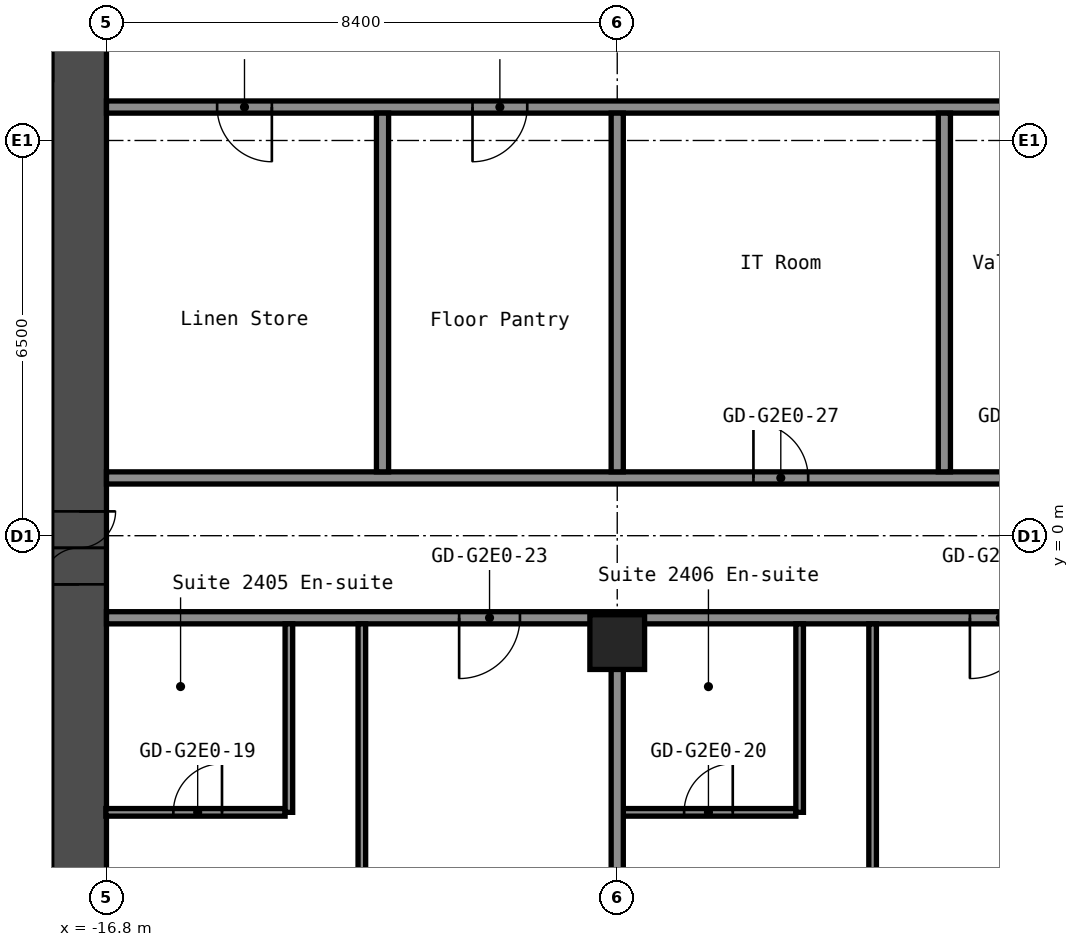
"""IFC4 building model, lengths in metres.
Left out: names, types, materials, properties, quantities, classifications, styles, units other than length and angle.
Written with IfcOpenShell. Run it as: python <this file> out.ifc"""

import sys

from ifc_helpers import new_model, si_unit, direction, frame, frame_2d, origin, origin_2d, place, context, subcontext, project, spatial, rectangle, hollow_rectangle, extrude, element, fill, save


model = new_model("IFC4")
c1 = context("Model", 3, precision=1e-05, world=origin(), true_north=direction((0.0, 1.0)))
c2 = subcontext(c1, "Body", "Model", "MODEL_VIEW")
j1 = project(units=[si_unit("LENGTHUNIT", "METRE"), si_unit("PLANEANGLEUNIT", "RADIAN")], contexts=[c1])
p1 = place(None, origin())
s1 = spatial("IfcSite", under=j1, at=p1, CompositionType="ELEMENT")
p2 = place(p1, origin())
s2 = spatial("IfcBuilding", under=s1, at=p2, CompositionType="ELEMENT")
p3 = place(p2, frame((0.0, 0.0, 88.2)))
s3 = spatial("IfcBuildingStorey", under=s2, at=p3, CompositionType="ELEMENT", Elevation=88.2)
p4 = place(p3, frame((-8.4, -1.75, 0.0), z_axis=(0.0, 0.0, 1.0), x_axis=(1.0, 0.0, 0.0)))
e1 = element("IfcColumn", 1, at=p4, inside=s3, PredefinedType="COLUMN", context=c2, shape_type="SweptSolid", body=[
    extrude(hollow_rectangle(XDim=0.9, YDim=0.9, WallThickness=0.036, at=origin_2d()), origin(), (0.0, 0.0, 1.0), 2.8),
])
p5 = place(p3, frame((-17.25, -8.4, 0.0), z_axis=(0.0, 0.0, 1.0), x_axis=(0.0, 1.0, 0.0)))
e2 = element("IfcWall", 2, at=p5, inside=s3, PredefinedType="SHEAR", context=c2, shape_type="SweptSolid", body=[
    extrude(rectangle(XDim=16.8, YDim=0.9, at=frame_2d((8.4, 0.0))), origin(), (0.0, 0.0, 1.0), 2.8),
])
p6 = place(p5, frame((7.6, 0.0, 0.0)))
e3 = element("IfcOpeningElement", 3, at=p6, cuts=e2, PredefinedType="OPENING", context=c2, shape_type="SweptSolid", body=[
    extrude(rectangle(XDim=1.2, YDim=2.1, at=frame_2d((0.6, 1.05))), frame((0.0, 0.46, 0.0), z_axis=(0.0, -1.0, 0.0), x_axis=(1.0, 0.0, 0.0)), (0.0, 0.0, 1.0), 0.92),
])
p7 = place(p3, frame((-32.7, 7.95, 0.0), z_axis=(0.0, 0.0, 1.0), x_axis=(1.0, 0.0, 0.0)))
e4 = element("IfcWall", 4, at=p7, inside=s3, PredefinedType="SHEAR", context=c2, shape_type="SweptSolid", body=[
    extrude(rectangle(XDim=15.0, YDim=0.9, at=frame_2d((7.5, 0.0))), origin(), (0.0, 0.0, 1.0), 2.8),
])
p8 = place(p7, frame((3.4, 0.0, 0.0)))
e5 = element("IfcOpeningElement", 5, at=p8, cuts=e4, PredefinedType="OPENING", context=c2, shape_type="SweptSolid", body=[
    extrude(rectangle(XDim=1.2, YDim=2.1, at=frame_2d((0.6, 1.05))), frame((0.0, 0.46, 0.0), z_axis=(0.0, -1.0, 0.0), x_axis=(1.0, 0.0, 0.0)), (0.0, 0.0, 1.0), 0.92),
])
p9 = place(p7, frame((0.75, 0.0, 0.0)))
e6 = element("IfcOpeningElement", 6, at=p9, cuts=e4, PredefinedType="OPENING", context=c2, shape_type="SweptSolid", body=[
    extrude(rectangle(XDim=0.9, YDim=2.1, at=frame_2d((0.45, 1.05))), frame((0.0, 0.46, 0.0), z_axis=(0.0, -1.0, 0.0), x_axis=(1.0, 0.0, 0.0)), (0.0, 0.0, 1.0), 0.92),
])
p10 = place(p3, frame((-16.81, -4.55, 0.0), z_axis=(0.0, 0.0, 1.0), x_axis=(1.0, 0.0, 0.0)))
e7 = element("IfcWall", 7, at=p10, inside=s3, PredefinedType="PARTITIONING", context=c2, shape_type="SweptSolid", body=[
    extrude(rectangle(XDim=2.948, YDim=0.125, at=frame_2d((1.474, 0.0))), origin(), (0.0, 0.0, 1.0), 2.8),
])
p11 = place(p10, frame((1.11, 0.0, 0.0)))
e8 = element("IfcOpeningElement", 8, at=p11, cuts=e7, PredefinedType="OPENING", context=c2, shape_type="SweptSolid", body=[
    extrude(rectangle(XDim=0.8, YDim=2.1, at=frame_2d((0.4, 1.05))), frame((0.0, 0.073, 0.0), z_axis=(0.0, -1.0, 0.0), x_axis=(1.0, 0.0, 0.0)), (0.0, 0.0, 1.0), 0.145),
])
p12 = place(p3, frame((-8.3, -4.55, 0.0), z_axis=(0.0, 0.0, 1.0), x_axis=(1.0, 0.0, 0.0)))
e9 = element("IfcWall", 9, at=p12, inside=s3, PredefinedType="PARTITIONING", context=c2, shape_type="SweptSolid", body=[
    extrude(rectangle(XDim=2.838, YDim=0.125, at=frame_2d((1.419, 0.0))), origin(), (0.0, 0.0, 1.0), 2.8),
])
p13 = place(p12, frame((1.0, 0.0, 0.0)))
e10 = element("IfcOpeningElement", 10, at=p13, cuts=e9, PredefinedType="OPENING", context=c2, shape_type="SweptSolid", body=[
    extrude(rectangle(XDim=0.8, YDim=2.1, at=frame_2d((0.4, 1.05))), frame((0.0, 0.073, 0.0), z_axis=(0.0, -1.0, 0.0), x_axis=(1.0, 0.0, 0.0)), (0.0, 0.0, 1.0), 0.145),
])
p14 = place(p3, frame((-16.8, -1.35, 0.0), z_axis=(0.0, 0.0, 1.0), x_axis=(1.0, 0.0, 0.0)))
e11 = element("IfcWall", 11, at=p14, inside=s3, PredefinedType="PARTITIONING", context=c2, shape_type="SweptSolid", body=[
    extrude(rectangle(XDim=33.6, YDim=0.2, at=frame_2d((16.8, 0.0))), origin(), (0.0, 0.0, 1.0), 2.8),
])
p15 = place(p14, frame((5.8, 0.0, 0.0)))
e12 = element("IfcOpeningElement", 12, at=p15, cuts=e11, PredefinedType="OPENING", context=c2, shape_type="SweptSolid", body=[
    extrude(rectangle(XDim=1.0, YDim=2.1, at=frame_2d((0.5, 1.05))), frame((0.0, 0.11, 0.0), z_axis=(0.0, -1.0, 0.0), x_axis=(1.0, 0.0, 0.0)), (0.0, 0.0, 1.0), 0.22),
])
p16 = place(p14, frame((14.2, 0.0, 0.0)))
e13 = element("IfcOpeningElement", 13, at=p16, cuts=e11, PredefinedType="OPENING", context=c2, shape_type="SweptSolid", body=[
    extrude(rectangle(XDim=1.0, YDim=2.1, at=frame_2d((0.5, 1.05))), frame((0.0, 0.11, 0.0), z_axis=(0.0, -1.0, 0.0), x_axis=(1.0, 0.0, 0.0)), (0.0, 0.0, 1.0), 0.22),
])
p17 = place(p14, frame((22.6, 0.0, 0.0)))
e14 = element("IfcOpeningElement", 14, at=p17, cuts=e11, PredefinedType="OPENING", context=c2, shape_type="SweptSolid", body=[
    extrude(rectangle(XDim=1.0, YDim=2.1, at=frame_2d((0.5, 1.05))), frame((0.0, 0.11, 0.0), z_axis=(0.0, -1.0, 0.0), x_axis=(1.0, 0.0, 0.0)), (0.0, 0.0, 1.0), 0.22),
])
p18 = place(p14, frame((26.8, 0.0, 0.0)))
e15 = element("IfcOpeningElement", 15, at=p18, cuts=e11, PredefinedType="OPENING", context=c2, shape_type="SweptSolid", body=[
    extrude(rectangle(XDim=1.0, YDim=2.1, at=frame_2d((0.5, 1.05))), frame((0.0, 0.11, 0.0), z_axis=(0.0, -1.0, 0.0), x_axis=(1.0, 0.0, 0.0)), (0.0, 0.0, 1.0), 0.22),
])
p19 = place(p3, frame((-16.8, 0.95, 0.0), z_axis=(0.0, 0.0, 1.0), x_axis=(1.0, 0.0, 0.0)))
e16 = element("IfcWall", 16, at=p19, inside=s3, PredefinedType="PARTITIONING", context=c2, shape_type="SweptSolid", body=[
    extrude(rectangle(XDim=33.6, YDim=0.2, at=frame_2d((16.8, 0.0))), origin(), (0.0, 0.0, 1.0), 2.8),
])
p20 = place(p19, frame((10.64, 0.0, 0.0)))
e17 = element("IfcOpeningElement", 17, at=p20, cuts=e16, PredefinedType="OPENING", context=c2, shape_type="SweptSolid", body=[
    extrude(rectangle(XDim=0.9, YDim=2.1, at=frame_2d((0.45, 1.05))), frame((0.0, 0.11, 0.0), z_axis=(0.0, -1.0, 0.0), x_axis=(1.0, 0.0, 0.0)), (0.0, 0.0, 1.0), 0.22),
])
p21 = place(p19, frame((14.84, 0.0, 0.0)))
e18 = element("IfcOpeningElement", 18, at=p21, cuts=e16, PredefinedType="OPENING", context=c2, shape_type="SweptSolid", body=[
    extrude(rectangle(XDim=0.9, YDim=2.1, at=frame_2d((0.45, 1.05))), frame((0.0, 0.11, 0.0), z_axis=(0.0, -1.0, 0.0), x_axis=(1.0, 0.0, 0.0)), (0.0, 0.0, 1.0), 0.22),
])
p22 = place(p19, frame((26.345, 0.0, 0.0)))
e19 = element("IfcOpeningElement", 19, at=p22, cuts=e16, PredefinedType="OPENING", context=c2, shape_type="SweptSolid", body=[
    extrude(rectangle(XDim=0.9, YDim=2.1, at=frame_2d((0.45, 1.05))), frame((0.0, 0.11, 0.0), z_axis=(0.0, -1.0, 0.0), x_axis=(1.0, 0.0, 0.0)), (0.0, 0.0, 1.0), 0.22),
])
p23 = place(p19, frame((30.545, 0.0, 0.0)))
e20 = element("IfcOpeningElement", 20, at=p23, cuts=e16, PredefinedType="OPENING", context=c2, shape_type="SweptSolid", body=[
    extrude(rectangle(XDim=0.9, YDim=2.1, at=frame_2d((0.45, 1.05))), frame((0.0, 0.11, 0.0), z_axis=(0.0, -1.0, 0.0), x_axis=(1.0, 0.0, 0.0)), (0.0, 0.0, 1.0), 0.22),
])
p24 = place(p3, frame((-16.8, 7.05, 0.0), z_axis=(0.0, 0.0, 1.0), x_axis=(1.0, 0.0, 0.0)))
e21 = element("IfcWall", 21, at=p24, inside=s3, PredefinedType="PARTITIONING", context=c2, shape_type="SweptSolid", body=[
    extrude(rectangle(XDim=33.6, YDim=0.2, at=frame_2d((16.8, 0.0))), origin(), (0.0, 0.0, 1.0), 2.8),
])
p25 = place(p24, frame((1.82, 0.0, 0.0)))
e22 = element("IfcOpeningElement", 22, at=p25, cuts=e21, PredefinedType="OPENING", context=c2, shape_type="SweptSolid", body=[
    extrude(rectangle(XDim=0.9, YDim=2.1, at=frame_2d((0.45, 1.05))), frame((0.0, 0.11, 0.0), z_axis=(0.0, -1.0, 0.0), x_axis=(1.0, 0.0, 0.0)), (0.0, 0.0, 1.0), 0.22),
])
p26 = place(p24, frame((6.02, 0.0, 0.0)))
e23 = element("IfcOpeningElement", 23, at=p26, cuts=e21, PredefinedType="OPENING", context=c2, shape_type="SweptSolid", body=[
    extrude(rectangle(XDim=0.9, YDim=2.1, at=frame_2d((0.45, 1.05))), frame((0.0, 0.11, 0.0), z_axis=(0.0, -1.0, 0.0), x_axis=(1.0, 0.0, 0.0)), (0.0, 0.0, 1.0), 0.22),
])
p27 = place(p24, frame((18.87, 0.0, 0.0)))
e24 = element("IfcOpeningElement", 24, at=p27, cuts=e21, PredefinedType="OPENING", context=c2, shape_type="SweptSolid", body=[
    extrude(rectangle(XDim=0.9, YDim=2.1, at=frame_2d((0.45, 1.05))), frame((0.0, 0.11, 0.0), z_axis=(0.0, -1.0, 0.0), x_axis=(1.0, 0.0, 0.0)), (0.0, 0.0, 1.0), 0.22),
])
p28 = place(p24, frame((23.07, 0.0, 0.0)))
e25 = element("IfcOpeningElement", 25, at=p28, cuts=e21, PredefinedType="OPENING", context=c2, shape_type="SweptSolid", body=[
    extrude(rectangle(XDim=0.9, YDim=2.1, at=frame_2d((0.45, 1.05))), frame((0.0, 0.11, 0.0), z_axis=(0.0, -1.0, 0.0), x_axis=(1.0, 0.0, 0.0)), (0.0, 0.0, 1.0), 0.22),
])
p29 = place(p3, frame((-13.8, -4.55, 0.0), z_axis=(0.0, 0.0, 1.0), x_axis=(0.0, 1.0, 0.0)))
e26 = element("IfcWall", 26, at=p29, inside=s3, PredefinedType="PARTITIONING", context=c2, shape_type="SweptSolid", body=[
    extrude(rectangle(XDim=3.1, YDim=0.125, at=frame_2d((1.55, 0.0))), origin(), (0.0, 0.0, 1.0), 2.8),
])
p30 = place(p3, frame((-12.6, -15.55, 0.0), z_axis=(0.0, 0.0, 1.0), x_axis=(0.0, 1.0, 0.0)))
e27 = element("IfcWall", 27, at=p30, inside=s3, PredefinedType="PARTITIONING", context=c2, shape_type="SweptSolid", body=[
    extrude(rectangle(XDim=14.1, YDim=0.125, at=frame_2d((7.05, 0.0))), origin(), (0.0, 0.0, 1.0), 2.8),
])
p31 = place(p30, frame((9.15, 0.0, 0.0)))
e28 = element("IfcOpeningElement", 28, at=p31, cuts=e27, PredefinedType="OPENING", context=c2, shape_type="SweptSolid", body=[
    extrude(rectangle(XDim=0.9, YDim=2.1, at=frame_2d((0.45, 1.05))), frame((0.0, 0.073, 0.0), z_axis=(0.0, -1.0, 0.0), x_axis=(1.0, 0.0, 0.0)), (0.0, 0.0, 1.0), 0.145),
])
p32 = place(p3, frame((-12.26, 1.05, 0.0), z_axis=(0.0, 0.0, 1.0), x_axis=(0.0, 1.0, 0.0)))
e29 = element("IfcWall", 29, at=p32, inside=s3, PredefinedType="PARTITIONING", context=c2, shape_type="SweptSolid", body=[
    extrude(rectangle(XDim=5.9, YDim=0.2, at=frame_2d((2.95, 0.0))), origin(), (0.0, 0.0, 1.0), 2.8),
])
p33 = place(p3, frame((-8.4, -15.55, 0.0), z_axis=(0.0, 0.0, 1.0), x_axis=(0.0, 1.0, 0.0)))
e30 = element("IfcWall", 30, at=p33, inside=s3, PredefinedType="PARTITIONING", context=c2, shape_type="SweptSolid", body=[
    extrude(rectangle(XDim=13.36, YDim=0.2, at=frame_2d((6.68, 0.0))), origin(), (0.0, 0.0, 1.0), 2.8),
])
p34 = place(p3, frame((-8.4, 1.05, 0.0), z_axis=(0.0, 0.0, 1.0), x_axis=(0.0, 1.0, 0.0)))
e31 = element("IfcWall", 31, at=p34, inside=s3, PredefinedType="PARTITIONING", context=c2, shape_type="SweptSolid", body=[
    extrude(rectangle(XDim=5.9, YDim=0.2, at=frame_2d((2.95, 0.0))), origin(), (0.0, 0.0, 1.0), 2.8),
])
p35 = place(p3, frame((-5.4, -4.55, 0.0), z_axis=(0.0, 0.0, 1.0), x_axis=(0.0, 1.0, 0.0)))
e32 = element("IfcWall", 32, at=p35, inside=s3, PredefinedType="PARTITIONING", context=c2, shape_type="SweptSolid", body=[
    extrude(rectangle(XDim=3.1, YDim=0.125, at=frame_2d((1.55, 0.0))), origin(), (0.0, 0.0, 1.0), 2.8),
])
p36 = place(p3, frame((-4.2, -15.55, 0.0), z_axis=(0.0, 0.0, 1.0), x_axis=(0.0, 1.0, 0.0)))
e33 = element("IfcWall", 33, at=p36, inside=s3, PredefinedType="PARTITIONING", context=c2, shape_type="SweptSolid", body=[
    extrude(rectangle(XDim=14.1, YDim=0.125, at=frame_2d((7.05, 0.0))), origin(), (0.0, 0.0, 1.0), 2.8),
])
p37 = place(p36, frame((9.15, 0.0, 0.0)))
e34 = element("IfcOpeningElement", 34, at=p37, cuts=e33, PredefinedType="OPENING", context=c2, shape_type="SweptSolid", body=[
    extrude(rectangle(XDim=0.9, YDim=2.1, at=frame_2d((0.45, 1.05))), frame((0.0, 0.073, 0.0), z_axis=(0.0, -1.0, 0.0), x_axis=(1.0, 0.0, 0.0)), (0.0, 0.0, 1.0), 0.145),
])
p38 = place(p3, frame((-3.02, 1.05, 0.0), z_axis=(0.0, 0.0, 1.0), x_axis=(0.0, 1.0, 0.0)))
e35 = element("IfcWall", 35, at=p38, inside=s3, PredefinedType="PARTITIONING", context=c2, shape_type="SweptSolid", body=[
    extrude(rectangle(XDim=5.9, YDim=0.2, at=frame_2d((2.95, 0.0))), origin(), (0.0, 0.0, 1.0), 2.8),
])
p39 = place(p6, origin())
e36 = element("IfcDoor", 36, at=p39, inside=s3, OperationType="DOUBLE_DOOR_SINGLE_SWING", PredefinedType="DOOR", context=c2, shape_type="SweptSolid", body=[
    extrude(rectangle(XDim=1.2, YDim=2.1, at=frame_2d((0.6, 1.05))), frame((0.0, 0.025, 0.0), z_axis=(0.0, -1.0, 0.0), x_axis=(1.0, 0.0, 0.0)), (0.0, 0.0, 1.0), 0.05),
])
fill(e3, e36)
p40 = place(p11, origin())
e37 = element("IfcDoor", 37, at=p40, inside=s3, OperationType="SINGLE_SWING_LEFT", PredefinedType="DOOR", context=c2, shape_type="SweptSolid", body=[
    extrude(rectangle(XDim=0.8, YDim=2.1, at=frame_2d((0.4, 1.05))), frame((0.0, 0.025, 0.0), z_axis=(0.0, -1.0, 0.0), x_axis=(1.0, 0.0, 0.0)), (0.0, 0.0, 1.0), 0.05),
])
fill(e8, e37)
p41 = place(p13, origin())
e38 = element("IfcDoor", 38, at=p41, inside=s3, OperationType="SINGLE_SWING_LEFT", PredefinedType="DOOR", context=c2, shape_type="SweptSolid", body=[
    extrude(rectangle(XDim=0.8, YDim=2.1, at=frame_2d((0.4, 1.05))), frame((0.0, 0.025, 0.0), z_axis=(0.0, -1.0, 0.0), x_axis=(1.0, 0.0, 0.0)), (0.0, 0.0, 1.0), 0.05),
])
fill(e10, e38)
p42 = place(p15, origin())
e39 = element("IfcDoor", 39, at=p42, inside=s3, OperationType="SINGLE_SWING_LEFT", PredefinedType="DOOR", context=c2, shape_type="SweptSolid", body=[
    extrude(rectangle(XDim=1.0, YDim=2.1, at=frame_2d((0.5, 1.05))), frame((0.0, 0.025, 0.0), z_axis=(0.0, -1.0, 0.0), x_axis=(1.0, 0.0, 0.0)), (0.0, 0.0, 1.0), 0.05),
])
fill(e12, e39)
p43 = place(p16, origin())
e40 = element("IfcDoor", 40, at=p43, inside=s3, OperationType="SINGLE_SWING_LEFT", PredefinedType="DOOR", context=c2, shape_type="SweptSolid", body=[
    extrude(rectangle(XDim=1.0, YDim=2.1, at=frame_2d((0.5, 1.05))), frame((0.0, 0.025, 0.0), z_axis=(0.0, -1.0, 0.0), x_axis=(1.0, 0.0, 0.0)), (0.0, 0.0, 1.0), 0.05),
])
fill(e13, e40)
p44 = place(p20, origin())
e41 = element("IfcDoor", 41, at=p44, inside=s3, OperationType="SINGLE_SWING_RIGHT", PredefinedType="DOOR", context=c2, shape_type="SweptSolid", body=[
    extrude(rectangle(XDim=0.9, YDim=2.1, at=frame_2d((0.45, 1.05))), frame((0.0, 0.025, 0.0), z_axis=(0.0, -1.0, 0.0), x_axis=(1.0, 0.0, 0.0)), (0.0, 0.0, 1.0), 0.05),
])
fill(e17, e41)
p45 = place(p25, origin())
e42 = element("IfcDoor", 42, at=p45, inside=s3, OperationType="SINGLE_SWING_RIGHT", PredefinedType="DOOR", context=c2, shape_type="SweptSolid", body=[
    extrude(rectangle(XDim=0.9, YDim=2.1, at=frame_2d((0.45, 1.05))), frame((0.0, 0.025, 0.0), z_axis=(0.0, -1.0, 0.0), x_axis=(1.0, 0.0, 0.0)), (0.0, 0.0, 1.0), 0.05),
])
fill(e22, e42)
p46 = place(p26, origin())
e43 = element("IfcDoor", 43, at=p46, inside=s3, OperationType="SINGLE_SWING_LEFT", PredefinedType="DOOR", context=c2, shape_type="SweptSolid", body=[
    extrude(rectangle(XDim=0.9, YDim=2.1, at=frame_2d((0.45, 1.05))), frame((0.0, 0.025, 0.0), z_axis=(0.0, -1.0, 0.0), x_axis=(1.0, 0.0, 0.0)), (0.0, 0.0, 1.0), 0.05),
])
fill(e23, e43)
save(model, sys.argv[1])
